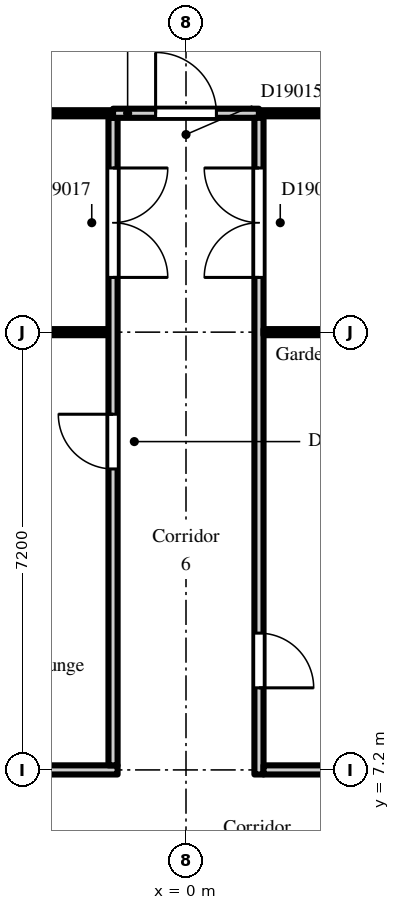
"""IFC4 building model, lengths in metres.
Left out: names, types, materials, properties, quantities, classifications, styles, units other than length and angle.
Written with IfcOpenShell. Run it as: python <this file> out.ifc"""

import sys

from ifc_helpers import new_model, si_unit, direction, frame, frame_2d, origin, place, context, subcontext, project, spatial, rectangle, extrude, element, fill, save


model = new_model("IFC4")
c1 = context("Model", 3, precision=1e-05, world=origin(), true_north=direction((0.0, 1.0)))
c2 = subcontext(c1, "Body", "Model", "MODEL_VIEW")
j1 = project(units=[si_unit("LENGTHUNIT", "METRE"), si_unit("PLANEANGLEUNIT", "RADIAN")], contexts=[c1])
p1 = place(None, origin())
s1 = spatial("IfcSite", under=j1, at=p1, CompositionType="ELEMENT")
p2 = place(p1, origin())
s2 = spatial("IfcBuilding", under=s1, at=p2, CompositionType="ELEMENT")
p3 = place(p2, frame((0.0, 0.0, 129.3)))
s3 = spatial("IfcBuildingStorey", under=s2, at=p3, CompositionType="ELEMENT", Elevation=129.3)
p4 = place(p3, frame((-3.9, 7.2, 0.0), z_axis=(0.0, 0.0, 1.0), x_axis=(1.0, 0.0, 0.0)))
e1 = element("IfcWall", 1, at=p4, inside=s3, PredefinedType="PARTITIONING", context=c2, shape_type="SweptSolid", body=[
    extrude(rectangle(XDim=2.775, YDim=0.15, at=frame_2d((1.387, 0.0))), origin(), (0.0, 0.0, 1.0), 2.6),
])
p5 = place(p3, frame((-3.9, 14.4, 0.0), z_axis=(0.0, 0.0, 1.0), x_axis=(1.0, 0.0, 0.0)))
e2 = element("IfcWall", 2, at=p5, inside=s3, PredefinedType="PARTITIONING", context=c2, shape_type="SweptSolid", body=[
    extrude(rectangle(XDim=2.625, YDim=0.1, at=frame_2d((1.312, 0.0))), origin(), (0.0, 0.0, 1.0), 2.6),
])
p6 = place(p3, frame((-3.55, 18.0, 0.0), z_axis=(0.0, 0.0, 1.0), x_axis=(1.0, 0.0, 0.0)))
e3 = element("IfcWall", 3, at=p6, inside=s3, PredefinedType="PARTITIONING", context=c2, shape_type="SweptSolid", body=[
    extrude(rectangle(XDim=2.35, YDim=0.1, at=frame_2d((1.175, 0.0))), origin(), (0.0, 0.0, 1.0), 2.6),
])
p7 = place(p3, frame((-1.2, 7.275, 0.0), z_axis=(0.0, 0.0, 1.0), x_axis=(0.0, 1.0, 0.0)))
e4 = element("IfcWall", 4, at=p7, inside=s3, PredefinedType="PARTITIONING", context=c2, shape_type="SweptSolid", body=[
    extrude(rectangle(XDim=10.65, YDim=0.15, at=frame_2d((5.325, 0.0))), origin(), (0.0, 0.0, 1.0), 2.6),
])
p8 = place(p7, frame((4.875, 0.0, 0.0)))
e5 = element("IfcOpeningElement", 5, at=p8, cuts=e4, PredefinedType="OPENING", context=c2, shape_type="SweptSolid", body=[
    extrude(rectangle(XDim=0.9, YDim=2.1, at=frame_2d((0.45, 1.05))), frame((0.0, 0.085, 0.0), z_axis=(0.0, -1.0, 0.0), x_axis=(1.0, 0.0, 0.0)), (0.0, 0.0, 1.0), 0.17),
])
p9 = place(p7, frame((8.025, 0.0, 0.0)))
e6 = element("IfcOpeningElement", 6, at=p9, cuts=e4, PredefinedType="OPENING", context=c2, shape_type="SweptSolid", body=[
    extrude(rectangle(XDim=1.8, YDim=2.1, at=frame_2d((0.9, 1.05))), frame((0.0, 0.085, 0.0), z_axis=(0.0, -1.0, 0.0), x_axis=(1.0, 0.0, 0.0)), (0.0, 0.0, 1.0), 0.17),
])
p10 = place(p3, frame((-1.2, 18.0, 0.0), z_axis=(0.0, 0.0, 1.0), x_axis=(1.0, 0.0, 0.0)))
e7 = element("IfcWall", 7, at=p10, inside=s3, PredefinedType="PARTITIONING", context=c2, shape_type="SweptSolid", body=[
    extrude(rectangle(XDim=2.4, YDim=0.15, at=frame_2d((1.2, 0.0))), origin(), (0.0, 0.0, 1.0), 2.6),
])
p11 = place(p10, frame((0.7, 0.0, 0.0)))
e8 = element("IfcOpeningElement", 8, at=p11, cuts=e7, PredefinedType="OPENING", context=c2, shape_type="SweptSolid", body=[
    extrude(rectangle(XDim=1.0, YDim=2.1, at=frame_2d((0.5, 1.05))), frame((0.0, 0.085, 0.0), z_axis=(0.0, -1.0, 0.0), x_axis=(1.0, 0.0, 0.0)), (0.0, 0.0, 1.0), 0.17),
])
p12 = place(p3, frame((1.2, 7.125, 0.0), z_axis=(0.0, 0.0, 1.0), x_axis=(0.0, 1.0, 0.0)))
e9 = element("IfcWall", 9, at=p12, inside=s3, PredefinedType="PARTITIONING", context=c2, shape_type="SweptSolid", body=[
    extrude(rectangle(XDim=10.8, YDim=0.15, at=frame_2d((5.4, 0.0))), origin(), (0.0, 0.0, 1.0), 2.6),
])
p13 = place(p12, frame((1.425, 0.0, 0.0)))
e10 = element("IfcOpeningElement", 10, at=p13, cuts=e9, PredefinedType="OPENING", context=c2, shape_type="SweptSolid", body=[
    extrude(rectangle(XDim=0.9, YDim=2.1, at=frame_2d((0.45, 1.05))), frame((0.0, 0.085, 0.0), z_axis=(0.0, -1.0, 0.0), x_axis=(1.0, 0.0, 0.0)), (0.0, 0.0, 1.0), 0.17),
])
p14 = place(p12, frame((8.175, 0.0, 0.0)))
e11 = element("IfcOpeningElement", 11, at=p14, cuts=e9, PredefinedType="OPENING", context=c2, shape_type="SweptSolid", body=[
    extrude(rectangle(XDim=1.8, YDim=2.1, at=frame_2d((0.9, 1.05))), frame((0.0, 0.085, 0.0), z_axis=(0.0, -1.0, 0.0), x_axis=(1.0, 0.0, 0.0)), (0.0, 0.0, 1.0), 0.17),
])
p15 = place(p3, frame((1.275, 7.2, 0.0), z_axis=(0.0, 0.0, 1.0), x_axis=(1.0, 0.0, 0.0)))
e12 = element("IfcWall", 12, at=p15, inside=s3, PredefinedType="PARTITIONING", context=c2, shape_type="SweptSolid", body=[
    extrude(rectangle(XDim=2.625, YDim=0.15, at=frame_2d((1.312, 0.0))), origin(), (0.0, 0.0, 1.0), 2.6),
])
p16 = place(p3, frame((1.275, 14.4, 0.0), z_axis=(0.0, 0.0, 1.0), x_axis=(1.0, 0.0, 0.0)))
e13 = element("IfcWall", 13, at=p16, inside=s3, PredefinedType="PARTITIONING", context=c2, shape_type="SweptSolid", body=[
    extrude(rectangle(XDim=2.625, YDim=0.1, at=frame_2d((1.312, 0.0))), origin(), (0.0, 0.0, 1.0), 2.6),
])
p17 = place(p3, frame((1.2, 18.0, 0.0), z_axis=(0.0, 0.0, 1.0), x_axis=(1.0, 0.0, 0.0)))
e14 = element("IfcWall", 14, at=p17, inside=s3, PredefinedType="PARTITIONING", context=c2, shape_type="SweptSolid", body=[
    extrude(rectangle(XDim=2.45, YDim=0.1, at=frame_2d((1.225, 0.0))), origin(), (0.0, 0.0, 1.0), 2.6),
])
p18 = place(p11, origin())
e15 = element("IfcDoor", 15, at=p18, inside=s3, OperationType="SINGLE_SWING_LEFT", PredefinedType="DOOR", context=c2, shape_type="SweptSolid", body=[
    extrude(rectangle(XDim=1.0, YDim=2.1, at=frame_2d((0.5, 1.05))), frame((0.0, 0.025, 0.0), z_axis=(0.0, -1.0, 0.0), x_axis=(1.0, 0.0, 0.0)), (0.0, 0.0, 1.0), 0.05),
])
fill(e8, e15)
p19 = place(p8, origin())
e16 = element("IfcDoor", 16, at=p19, inside=s3, OperationType="SINGLE_SWING_RIGHT", PredefinedType="DOOR", context=c2, shape_type="SweptSolid", body=[
    extrude(rectangle(XDim=0.9, YDim=2.1, at=frame_2d((0.45, 1.05))), frame((0.0, 0.025, 0.0), z_axis=(0.0, -1.0, 0.0), x_axis=(1.0, 0.0, 0.0)), (0.0, 0.0, 1.0), 0.05),
])
fill(e5, e16)
p20 = place(p9, frame((1.8, 0.0, 0.0), z_axis=(0.0, 0.0, 1.0), x_axis=(-1.0, 0.0, 0.0)))
e17 = element("IfcDoor", 17, at=p20, inside=s3, OperationType="DOUBLE_DOOR_DOUBLE_SWING", PredefinedType="DOOR", context=c2, shape_type="SweptSolid", body=[
    extrude(rectangle(XDim=1.8, YDim=2.1, at=frame_2d((0.9, 1.05))), frame((0.0, 0.025, 0.0), z_axis=(0.0, -1.0, 0.0), x_axis=(1.0, 0.0, 0.0)), (0.0, 0.0, 1.0), 0.05),
])
fill(e6, e17)
p21 = place(p13, frame((0.9, 0.0, 0.0), z_axis=(0.0, 0.0, 1.0), x_axis=(-1.0, 0.0, 0.0)))
e18 = element("IfcDoor", 18, at=p21, inside=s3, OperationType="SINGLE_SWING_RIGHT", PredefinedType="DOOR", context=c2, shape_type="SweptSolid", body=[
    extrude(rectangle(XDim=0.9, YDim=2.1, at=frame_2d((0.45, 1.05))), frame((0.0, 0.025, 0.0), z_axis=(0.0, -1.0, 0.0), x_axis=(1.0, 0.0, 0.0)), (0.0, 0.0, 1.0), 0.05),
])
fill(e10, e18)
p22 = place(p14, origin())
e19 = element("IfcDoor", 19, at=p22, inside=s3, OperationType="DOUBLE_DOOR_DOUBLE_SWING", PredefinedType="DOOR", context=c2, shape_type="SweptSolid", body=[
    extrude(rectangle(XDim=1.8, YDim=2.1, at=frame_2d((0.9, 1.05))), frame((0.0, 0.025, 0.0), z_axis=(0.0, -1.0, 0.0), x_axis=(1.0, 0.0, 0.0)), (0.0, 0.0, 1.0), 0.05),
])
fill(e11, e19)
save(model, sys.argv[1])
